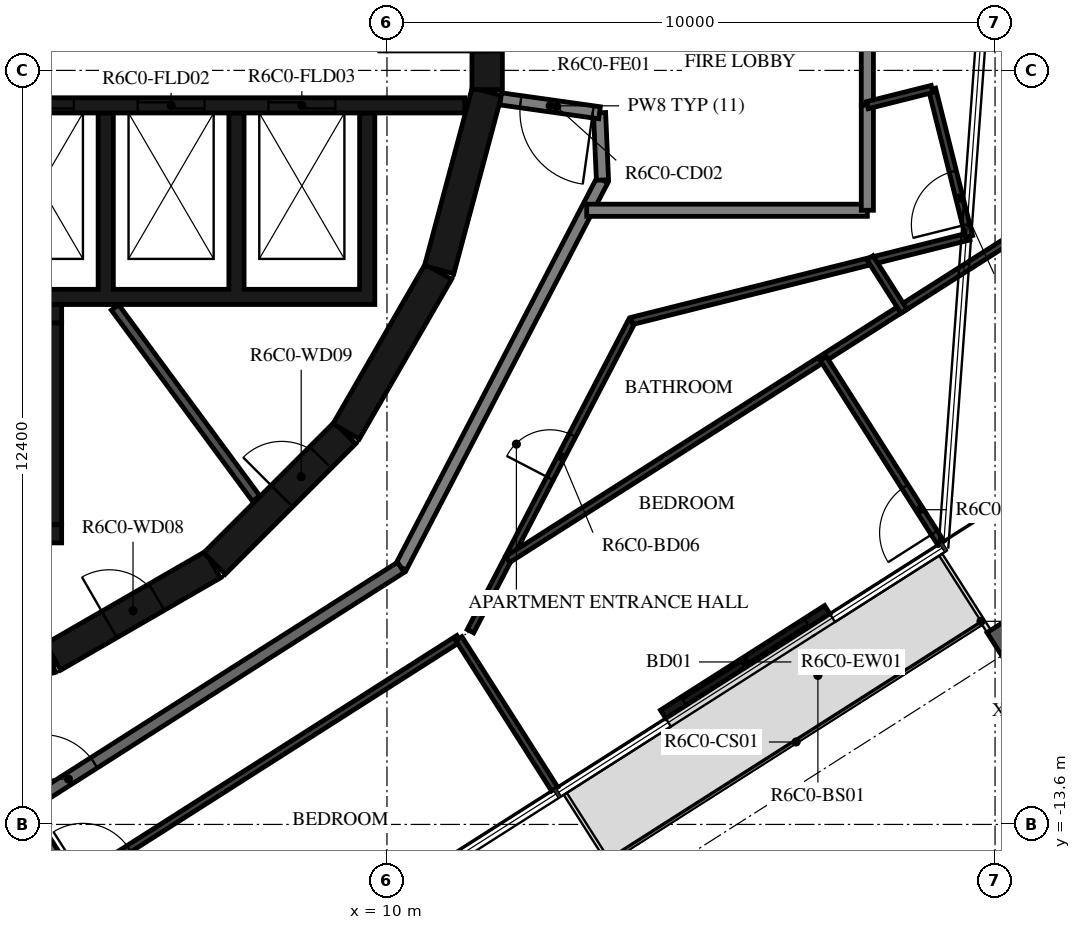
"""IFC4 building model, lengths in metres.
Left out: names, types, materials, properties, quantities, classifications, styles, units other than length and angle.
Written with IfcOpenShell. Run it as: python <this file> out.ifc"""

import sys

from ifc_helpers import new_model, si_unit, direction, frame, frame_2d, origin, origin_2d, place, context, subcontext, project, spatial, polyline, rectangle, i_section, outline, extrude, element, fill, save


model = new_model("IFC4")
c1 = context("Model", 3, precision=1e-05, world=origin(), true_north=direction((0.0, 1.0)))
c2 = subcontext(c1, "Body", "Model", "MODEL_VIEW")
j1 = project(units=[si_unit("LENGTHUNIT", "METRE"), si_unit("PLANEANGLEUNIT", "RADIAN")], contexts=[c1])
p1 = place(None, origin())
s1 = spatial("IfcSite", under=j1, at=p1, CompositionType="ELEMENT")
p2 = place(p1, origin())
s2 = spatial("IfcBuilding", under=s1, at=p2, CompositionType="ELEMENT")
p3 = place(p2, frame((0.0, 0.0, 254.7)))
s3 = spatial("IfcBuildingStorey", under=s2, at=p3, CompositionType="ELEMENT", Elevation=254.7)
p4 = place(p3, frame((20.237, -10.744, -0.38), z_axis=(0.0, 0.0, 1.0), x_axis=(-0.843391139633, -0.537300088953, 0.0)))
e1 = element("IfcColumn", 1, at=p4, inside=s3, PredefinedType="COLUMN", context=c2, shape_type="SweptSolid", body=[
    extrude(i_section(OverallWidth=0.3, OverallDepth=0.9, WebThickness=0.019, FlangeThickness=0.035, FilletRadius=0.03, at=origin_2d()), origin(), (0.0, 0.0, 1.0), 2.616),
])
p5 = place(p3, frame((14.541, -11.788, 0.0), z_axis=(0.0, 0.0, 1.0), x_axis=(0.843419508298, 0.53725555653, 0.0)))
e2 = element("IfcWall", 2, at=p5, inside=s3, PredefinedType="STANDARD", context=c2, shape_type="SweptSolid", body=[
    extrude(rectangle(XDim=3.2, YDim=0.16, at=frame_2d((1.6, 0.0))), origin(), (0.0, 0.0, 1.0), 3.05),
])
p6 = place(p5, frame((0.4, 0.0, 0.0)))
e3 = element("IfcOpeningElement", 3, at=p6, cuts=e2, PredefinedType="OPENING", context=c2, shape_type="SweptSolid", body=[
    extrude(rectangle(XDim=2.4, YDim=2.4, at=frame_2d((1.2, 1.2))), frame((0.0, 0.09, 0.0), z_axis=(0.0, -1.0, 0.0), x_axis=(1.0, 0.0, 0.0)), (0.0, 0.0, 1.0), 0.18),
])
p7 = place(p3, frame((1.55, -11.643, 0.0), z_axis=(0.0, 0.0, 1.0), x_axis=(0.965948410781, 0.258734743916, 0.0)))
e4 = element("IfcWall", 4, at=p7, inside=s3, PredefinedType="SHEAR", context=c2, shape_type="SweptSolid", body=[
    extrude(rectangle(XDim=3.033, YDim=0.5, at=frame_2d((1.516, 0.0))), origin(), (0.0, 0.0, 1.0), 3.05),
])
p8 = place(p3, frame((4.51, -10.845, 0.0), z_axis=(0.0, 0.0, 1.0), x_axis=(0.865975092491, 0.500087131594, 0.0)))
e5 = element("IfcWall", 5, at=p8, inside=s3, PredefinedType="SHEAR", context=c2, shape_type="SweptSolid", body=[
    extrude(rectangle(XDim=3.033, YDim=0.5, at=frame_2d((1.516, 0.0))), origin(), (0.0, 0.0, 1.0), 3.05),
])
p9 = place(p8, frame((1.066, 0.0, 0.0)))
e6 = element("IfcOpeningElement", 6, at=p9, cuts=e5, PredefinedType="OPENING", context=c2, shape_type="SweptSolid", body=[
    extrude(rectangle(XDim=0.9, YDim=2.1, at=frame_2d((0.45, 1.05))), frame((0.0, 0.26, 0.0), z_axis=(0.0, -1.0, 0.0), x_axis=(1.0, 0.0, 0.0)), (0.0, 0.0, 1.0), 0.52),
])
p10 = place(p3, frame((7.164, -9.308, 0.0), z_axis=(0.0, 0.0, 1.0), x_axis=(0.707106781187, 0.707106781187, 0.0)))
e7 = element("IfcWall", 7, at=p10, inside=s3, PredefinedType="SHEAR", context=c2, shape_type="SweptSolid", body=[
    extrude(rectangle(XDim=3.032, YDim=0.5, at=frame_2d((1.516, 0.0))), origin(), (0.0, 0.0, 1.0), 3.05),
])
p11 = place(p10, frame((1.566, 0.0, 0.0)))
e8 = element("IfcOpeningElement", 8, at=p11, cuts=e7, PredefinedType="OPENING", context=c2, shape_type="SweptSolid", body=[
    extrude(rectangle(XDim=0.9, YDim=2.1, at=frame_2d((0.45, 1.05))), frame((0.0, 0.26, 0.0), z_axis=(0.0, -1.0, 0.0), x_axis=(1.0, 0.0, 0.0)), (0.0, 0.0, 1.0), 0.52),
])
for number, where, z_axis, x_axis in (
    (9, (9.329, -7.137, 0.0), (0.0, 0.0, 1.0), (0.5, 0.866, 0.0)),
    (10, (10.858, -4.479, 0.0), (0.0, 0.0, 1.0), (0.259, 0.966, 0.0)),
):
    element("IfcWall", number, at=place(p3, frame(where, z_axis=z_axis, x_axis=x_axis)), inside=s3, PredefinedType="SHEAR", context=c2, shape_type="SweptSolid", body=[
        extrude(rectangle(XDim=3.033, YDim=0.5, at=frame_2d((1.516, 0.0))), origin(), (0.0, 0.0, 1.0), 3.05),
    ])
p12 = place(p3, frame((11.647, -1.516, 0.0), z_axis=(0.0, 0.0, 1.0), x_axis=(0.0, 1.0, 0.0)))
e11 = element("IfcWall", 11, at=p12, inside=s3, PredefinedType="SHEAR", context=c2, shape_type="SweptSolid", body=[
    extrude(rectangle(XDim=3.033, YDim=0.5, at=frame_2d((1.516, 0.0))), origin(), (0.0, 0.0, 1.0), 3.05),
])
p13 = place(p12, frame((0.616, 0.0, 0.0)))
e12 = element("IfcOpeningElement", 12, at=p13, cuts=e11, PredefinedType="OPENING", context=c2, shape_type="SweptSolid", body=[
    extrude(rectangle(XDim=1.8, YDim=2.1, at=frame_2d((0.9, 1.05))), frame((0.0, 0.26, 0.0), z_axis=(0.0, -1.0, 0.0), x_axis=(1.0, 0.0, 0.0)), (0.0, 0.0, 1.0), 0.52),
])
p14 = place(p3, frame((-2.4, -5.2, 0.0), z_axis=(0.0, 0.0, 1.0), x_axis=(1.0, 0.0, 0.0)))
e13 = element("IfcWall", 13, at=p14, inside=s3, PredefinedType="SHEAR", context=c2, shape_type="SweptSolid", body=[
    extrude(rectangle(XDim=7.05, YDim=0.3, at=frame_2d((3.525, 0.0))), origin(), (0.0, 0.0, 1.0), 3.05),
])
p15 = place(p3, frame((4.5, -8.67, 0.0), z_axis=(0.0, 0.0, 1.0), x_axis=(0.0, 1.0, 0.0)))
e14 = element("IfcWall", 14, at=p15, inside=s3, PredefinedType="SHEAR", context=c2, shape_type="SweptSolid", body=[
    extrude(rectangle(XDim=3.32, YDim=0.3, at=frame_2d((1.66, 0.0))), origin(), (0.0, 0.0, 1.0), 3.05),
])
p16 = place(p3, frame((0.1, -8.82, 0.0), z_axis=(0.0, 0.0, 1.0), x_axis=(1.0, 0.0, 0.0)))
e15 = element("IfcWall", 15, at=p16, inside=s3, PredefinedType="SHEAR", context=c2, shape_type="SweptSolid", body=[
    extrude(rectangle(XDim=4.55, YDim=0.3, at=frame_2d((2.275, 0.0))), origin(), (0.0, 0.0, 1.0), 3.05),
])
p17 = place(p3, origin())
e16 = element("IfcWall", 16, at=p17, inside=s3, PredefinedType="SHEAR", context=c2, shape_type="SweptSolid", body=[
    extrude(outline(polyline([(9.8, -5.05), (9.8, -4.8), (9.8, -1.9), (9.55, -1.9), (9.55, -4.8), (7.65, -4.8), (7.65, -1.9), (7.4, -1.9), (7.4, -4.8), (5.5, -4.8), (5.5, -1.9), (5.25, -1.9), (5.25, -4.8), (3.35, -4.8), (3.35, -1.9), (3.1, -1.9), (3.1, -4.8), (1.2, -4.8), (1.2, -1.9), (0.95, -1.9), (0.95, -4.8), (-0.95, -4.8), (-0.95, -1.9), (-1.2, -1.9), (-1.2, -4.8), (-3.1, -4.8), (-3.1, -1.9), (-3.35, -1.9), (-3.35, -4.8), (-5.25, -4.8), (-5.25, -1.9), (-5.5, -1.9), (-5.5, -4.8), (-7.4, -4.8), (-7.4, -1.9), (-7.65, -1.9), (-7.65, -4.8), (-9.55, -4.8), (-9.55, -1.9), (-9.8, -1.9), (-9.8, -4.8), (-9.8, -5.05), (9.8, -5.05)])), origin(), (0.0, 0.0, 1.0), 3.05),
])
p18 = place(p3, frame((3.35, -1.775, 0.0), z_axis=(0.0, 0.0, 1.0), x_axis=(1.0, 0.0, 0.0)))
e17 = element("IfcWall", 17, at=p18, inside=s3, PredefinedType="SHEAR", context=c2, shape_type="SweptSolid", body=[
    extrude(rectangle(XDim=7.93, YDim=0.25, at=frame_2d((3.965, 0.0))), origin(), (0.0, 0.0, 1.0), 3.05),
])
p19 = place(p18, frame((0.4, 0.0, 0.0)))
e18 = element("IfcOpeningElement", 18, at=p19, cuts=e17, PredefinedType="OPENING", context=c2, shape_type="SweptSolid", body=[
    extrude(rectangle(XDim=1.1, YDim=2.4, at=frame_2d((0.55, 1.2))), frame((0.0, 0.135, 0.0), z_axis=(0.0, -1.0, 0.0), x_axis=(1.0, 0.0, 0.0)), (0.0, 0.0, 1.0), 0.27),
])
p20 = place(p18, frame((2.55, 0.0, 0.0)))
e19 = element("IfcOpeningElement", 19, at=p20, cuts=e17, PredefinedType="OPENING", context=c2, shape_type="SweptSolid", body=[
    extrude(rectangle(XDim=1.1, YDim=2.4, at=frame_2d((0.55, 1.2))), frame((0.0, 0.135, 0.0), z_axis=(0.0, -1.0, 0.0), x_axis=(1.0, 0.0, 0.0)), (0.0, 0.0, 1.0), 0.27),
])
p21 = place(p18, frame((4.7, 0.0, 0.0)))
e20 = element("IfcOpeningElement", 20, at=p21, cuts=e17, PredefinedType="OPENING", context=c2, shape_type="SweptSolid", body=[
    extrude(rectangle(XDim=1.1, YDim=2.4, at=frame_2d((0.55, 1.2))), frame((0.0, 0.135, 0.0), z_axis=(0.0, -1.0, 0.0), x_axis=(1.0, 0.0, 0.0)), (0.0, 0.0, 1.0), 0.27),
])
p22 = place(p3, frame((5.528, -5.098, 0.0), z_axis=(0.0, 0.0, 1.0), x_axis=(0.594034318069, -0.804439698769, 0.0)))
e21 = element("IfcWall", 21, at=p22, inside=s3, PredefinedType="PARTITIONING", context=c2, shape_type="SweptSolid", body=[
    extrude(rectangle(XDim=3.907, YDim=0.15, at=frame_2d((1.953, 0.0))), origin(), (0.0, 0.0, 1.0), 3.05),
])
p23 = place(p3, frame((10.228, -9.372, 0.0), z_axis=(0.0, 0.0, 1.0), x_axis=(0.461759464021, 0.887005184532, 0.0)))
e22 = element("IfcWall", 22, at=p23, inside=s3, PredefinedType="STANDARD", context=c2, shape_type="SweptSolid", body=[
    extrude(rectangle(XDim=7.181, YDim=0.2, at=frame_2d((3.591, 0.0))), origin(), (0.0, 0.0, 1.0), 3.05),
])
p24 = place(p3, frame((13.544, -3.003, 0.0), z_axis=(0.0, 0.0, 1.0), x_axis=(-0.043666917606, 0.999046145234, 0.0)))
e23 = element("IfcWall", 23, at=p24, inside=s3, PredefinedType="STANDARD", context=c2, shape_type="SweptSolid", body=[
    extrude(rectangle(XDim=1.107, YDim=0.2, at=frame_2d((0.553, 0.0))), origin(), (0.0, 0.0, 1.0), 3.05),
])
p25 = place(p3, frame((13.496, -1.897, 0.0), z_axis=(0.0, 0.0, 1.0), x_axis=(-0.99026234641, 0.139213811391, 0.0)))
e24 = element("IfcWall", 24, at=p25, inside=s3, PredefinedType="STANDARD", context=c2, shape_type="SweptSolid", body=[
    extrude(rectangle(XDim=1.641, YDim=0.2, at=frame_2d((0.821, 0.0))), origin(), (0.0, 0.0, 1.0), 3.05),
])
p26 = place(p25, frame((0.11, 0.0, 0.0)))
e25 = element("IfcOpeningElement", 25, at=p26, cuts=e24, PredefinedType="OPENING", context=c2, shape_type="SweptSolid", body=[
    extrude(rectangle(XDim=1.2, YDim=2.1, at=frame_2d((0.6, 1.05))), frame((0.0, 0.11, 0.0), z_axis=(0.0, -1.0, 0.0), x_axis=(1.0, 0.0, 0.0)), (0.0, 0.0, 1.0), 0.22),
])
p27 = place(p3, frame((4.172, -13.231, 0.0), z_axis=(0.0, 0.0, 1.0), x_axis=(0.843388394728, 0.537304397561, 0.0)))
e26 = element("IfcWall", 26, at=p27, inside=s3, PredefinedType="STANDARD", context=c2, shape_type="SweptSolid", body=[
    extrude(rectangle(XDim=7.181, YDim=0.2, at=frame_2d((3.59, 0.0))), origin(), (0.0, 0.0, 1.0), 3.05),
])
p28 = place(p27, frame((0.2, 0.0, 0.0)))
e27 = element("IfcOpeningElement", 27, at=p28, cuts=e26, PredefinedType="OPENING", context=c2, shape_type="SweptSolid", body=[
    extrude(rectangle(XDim=1.0, YDim=2.1, at=frame_2d((0.5, 1.05))), frame((0.0, 0.11, 0.0), z_axis=(0.0, -1.0, 0.0), x_axis=(1.0, 0.0, 0.0)), (0.0, 0.0, 1.0), 0.22),
])
p29 = place(p3, frame((17.9, -1.772, 0.0), z_axis=(0.0, 0.0, 1.0), x_axis=(0.0, 1.0, 0.0)))
e28 = element("IfcWall", 28, at=p29, inside=s3, PredefinedType="STANDARD", context=c2, shape_type="SweptSolid", body=[
    extrude(rectangle(XDim=5.272, YDim=0.2, at=frame_2d((2.636, 0.0))), origin(), (0.0, 0.0, 1.0), 3.05),
])
p30 = place(p3, frame((13.285, -3.5, 0.0), z_axis=(0.0, 0.0, 1.0), x_axis=(1.0, 0.0, 0.0)))
e29 = element("IfcWall", 29, at=p30, inside=s3, PredefinedType="STANDARD", context=c2, shape_type="SweptSolid", body=[
    extrude(rectangle(XDim=4.615, YDim=0.2, at=frame_2d((2.308, 0.0))), origin(), (0.0, 0.0, 1.0), 3.05),
])
p31 = place(p3, frame((17.9, -3.5, 0.0), z_axis=(0.0, 0.0, 1.0), x_axis=(0.0, 1.0, 0.0)))
e30 = element("IfcWall", 30, at=p31, inside=s3, PredefinedType="STANDARD", context=c2, shape_type="SweptSolid", body=[
    extrude(rectangle(XDim=1.728, YDim=0.2, at=frame_2d((0.864, 0.0))), origin(), (0.0, 0.0, 1.0), 3.05),
])
p32 = place(p3, frame((6.407, -17.064, 0.0), z_axis=(0.0, 0.0, 1.0), x_axis=(-0.537324777979, 0.843375410461, 0.0)))
e31 = element("IfcWall", 31, at=p32, inside=s3, PredefinedType="STANDARD", context=c2, shape_type="SweptSolid", body=[
    extrude(rectangle(XDim=4.535, YDim=0.2, at=frame_2d((2.268, 0.0))), origin(), (0.0, 0.0, 1.0), 3.05),
])
p33 = place(p3, frame((4.83, -14.59, 0.0), z_axis=(0.0, 0.0, 1.0), x_axis=(0.843393042763, 0.537297101629, 0.0)))
e32 = element("IfcWall", 32, at=p33, inside=s3, PredefinedType="PARTITIONING", context=c2, shape_type="SweptSolid", body=[
    extrude(rectangle(XDim=7.53, YDim=0.12, at=frame_2d((3.765, 0.0))), origin(), (0.0, 0.0, 1.0), 3.05),
])
p34 = place(p33, frame((0.2, 0.0, 0.0)))
e33 = element("IfcOpeningElement", 33, at=p34, cuts=e32, PredefinedType="OPENING", context=c2, shape_type="SweptSolid", body=[
    extrude(rectangle(XDim=0.9, YDim=2.1, at=frame_2d((0.45, 1.05))), frame((0.0, 0.07, 0.0), z_axis=(0.0, -1.0, 0.0), x_axis=(1.0, 0.0, 0.0)), (0.0, 0.0, 1.0), 0.14),
])
p35 = place(p3, frame((11.373, -10.421, 0.0), z_axis=(0.0, 0.0, 1.0), x_axis=(0.461738939635, 0.887015868869, 0.0)))
e34 = element("IfcWall", 34, at=p35, inside=s3, PredefinedType="PARTITIONING", context=c2, shape_type="SweptSolid", body=[
    extrude(rectangle(XDim=5.752, YDim=0.12, at=frame_2d((2.876, 0.0))), origin(), (0.0, 0.0, 1.0), 3.05),
])
p36 = place(p35, frame((2.831, 0.0, 0.0)))
e35 = element("IfcOpeningElement", 35, at=p36, cuts=e34, PredefinedType="OPENING", context=c2, shape_type="SweptSolid", body=[
    extrude(rectangle(XDim=0.8, YDim=2.1, at=frame_2d((0.4, 1.05))), frame((0.0, 0.07, 0.0), z_axis=(0.0, -1.0, 0.0), x_axis=(1.0, 0.0, 0.0)), (0.0, 0.0, 1.0), 0.14),
])
p37 = place(p3, frame((14.029, -5.32, 0.0), z_axis=(0.0, 0.0, 1.0), x_axis=(0.969999099814, 0.243108507378, 0.0)))
e36 = element("IfcWall", 36, at=p37, inside=s3, PredefinedType="PARTITIONING", context=c2, shape_type="SweptSolid", body=[
    extrude(rectangle(XDim=5.715, YDim=0.12, at=frame_2d((2.857, 0.0))), origin(), (0.0, 0.0, 1.0), 3.05),
])
p38 = place(p3, frame((19.573, -3.93, 0.0), z_axis=(0.0, 0.0, 1.0), x_axis=(-0.243155959183, 0.96998720585, 0.0)))
e37 = element("IfcWall", 37, at=p38, inside=s3, PredefinedType="PARTITIONING", context=c2, shape_type="SweptSolid", body=[
    extrude(rectangle(XDim=2.5, YDim=0.12, at=frame_2d((1.25, 0.0))), origin(), (0.0, 0.0, 1.0), 3.05),
])
p39 = place(p38, frame((0.2, 0.0, 0.0)))
e38 = element("IfcOpeningElement", 38, at=p39, cuts=e37, PredefinedType="OPENING", context=c2, shape_type="SweptSolid", body=[
    extrude(rectangle(XDim=0.9, YDim=2.1, at=frame_2d((0.45, 1.05))), frame((0.0, 0.07, 0.0), z_axis=(0.0, -1.0, 0.0), x_axis=(1.0, 0.0, 0.0)), (0.0, 0.0, 1.0), 0.14),
])
p40 = place(p3, frame((18.965, -1.505, 0.0), z_axis=(0.0, 0.0, 1.0), x_axis=(-0.969998406835, -0.243111272339, 0.0)))
e39 = element("IfcWall", 39, at=p40, inside=s3, PredefinedType="PARTITIONING", context=c2, shape_type="SweptSolid", body=[
    extrude(rectangle(XDim=1.098, YDim=0.12, at=frame_2d((0.549, 0.0))), origin(), (0.0, 0.0, 1.0), 3.05),
])
p41 = place(p3, frame((12.758, -13.018, 0.0), z_axis=(0.0, 0.0, 1.0), x_axis=(-0.537338423153, 0.843366716798, 0.0)))
e40 = element("IfcWall", 40, at=p41, inside=s3, PredefinedType="PARTITIONING", context=c2, shape_type="SweptSolid", body=[
    extrude(rectangle(XDim=2.934, YDim=0.12, at=frame_2d((1.467, 0.0))), origin(), (0.0, 0.0, 1.0), 3.05),
])
p42 = place(p3, frame((21.837, -2.966, 0.0), z_axis=(0.0, 0.0, 1.0), x_axis=(-0.843394529709, -0.537294767569, 0.0)))
e41 = element("IfcWall", 41, at=p42, inside=s3, PredefinedType="PARTITIONING", context=c2, shape_type="SweptSolid", body=[
    extrude(rectangle(XDim=11.678, YDim=0.12, at=frame_2d((5.839, 0.0))), origin(), (0.0, 0.0, 1.0), 3.05),
])
p43 = place(p42, frame((0.2, 0.0, 0.0)))
e42 = element("IfcOpeningElement", 42, at=p43, cuts=e41, PredefinedType="OPENING", context=c2, shape_type="SweptSolid", body=[
    extrude(rectangle(XDim=0.9, YDim=2.1, at=frame_2d((0.45, 1.05))), frame((0.0, 0.07, 0.0), z_axis=(0.0, -1.0, 0.0), x_axis=(1.0, 0.0, 0.0)), (0.0, 0.0, 1.0), 0.14),
])
p44 = place(p3, frame((19.109, -8.972, 0.0), z_axis=(0.0, 0.0, 1.0), x_axis=(-0.537318625891, 0.843379329999, 0.0)))
e43 = element("IfcWall", 43, at=p44, inside=s3, PredefinedType="PARTITIONING", context=c2, shape_type="SweptSolid", body=[
    extrude(rectangle(XDim=3.6, YDim=0.12, at=frame_2d((1.8, 0.0))), origin(), (0.0, 0.0, 1.0), 3.05),
])
p45 = place(p44, frame((0.2, 0.0, 0.0)))
e44 = element("IfcOpeningElement", 44, at=p45, cuts=e43, PredefinedType="OPENING", context=c2, shape_type="SweptSolid", body=[
    extrude(rectangle(XDim=0.9, YDim=2.1, at=frame_2d((0.45, 1.05))), frame((0.0, 0.07, 0.0), z_axis=(0.0, -1.0, 0.0), x_axis=(1.0, 0.0, 0.0)), (0.0, 0.0, 1.0), 0.14),
])
p46 = place(p3, frame((18.503, -5.161, 0.0), z_axis=(0.0, 0.0, 1.0), x_axis=(-0.537208231854, 0.843449652101, 0.0)))
e45 = element("IfcWall", 45, at=p46, inside=s3, PredefinedType="PARTITIONING", context=c2, shape_type="SweptSolid", body=[
    extrude(rectangle(XDim=1.044, YDim=0.12, at=frame_2d((0.522, 0.0))), origin(), (0.0, 0.0, 1.0), 3.05),
])
p47 = place(p6, origin())
e46 = element("IfcDoor", 46, at=p47, inside=s3, OperationType="DOUBLE_DOOR_SLIDING", PredefinedType="DOOR", context=c2, shape_type="SweptSolid", body=[
    extrude(rectangle(XDim=2.4, YDim=2.4, at=frame_2d((1.2, 1.2))), frame((0.0, 0.025, 0.0), z_axis=(0.0, -1.0, 0.0), x_axis=(1.0, 0.0, 0.0)), (0.0, 0.0, 1.0), 0.05),
])
fill(e3, e46)
p48 = place(p13, origin())
e47 = element("IfcDoor", 47, at=p48, inside=s3, OperationType="DOUBLE_DOOR_SINGLE_SWING", PredefinedType="DOOR", context=c2, shape_type="SweptSolid", body=[
    extrude(rectangle(XDim=1.8, YDim=2.1, at=frame_2d((0.9, 1.05))), frame((0.0, 0.025, 0.0), z_axis=(0.0, -1.0, 0.0), x_axis=(1.0, 0.0, 0.0)), (0.0, 0.0, 1.0), 0.05),
])
fill(e12, e47)
p49 = place(p19, origin())
e48 = element("IfcDoor", 48, at=p49, inside=s3, OperationType="DOUBLE_DOOR_SLIDING", PredefinedType="DOOR", context=c2, shape_type="SweptSolid", body=[
    extrude(rectangle(XDim=1.1, YDim=2.4, at=frame_2d((0.55, 1.2))), frame((0.0, 0.025, 0.0), z_axis=(0.0, -1.0, 0.0), x_axis=(1.0, 0.0, 0.0)), (0.0, 0.0, 1.0), 0.05),
])
fill(e18, e48)
p50 = place(p20, origin())
e49 = element("IfcDoor", 49, at=p50, inside=s3, OperationType="DOUBLE_DOOR_SLIDING", PredefinedType="DOOR", context=c2, shape_type="SweptSolid", body=[
    extrude(rectangle(XDim=1.1, YDim=2.4, at=frame_2d((0.55, 1.2))), frame((0.0, 0.025, 0.0), z_axis=(0.0, -1.0, 0.0), x_axis=(1.0, 0.0, 0.0)), (0.0, 0.0, 1.0), 0.05),
])
fill(e19, e49)
p51 = place(p21, origin())
e50 = element("IfcDoor", 50, at=p51, inside=s3, OperationType="DOUBLE_DOOR_SLIDING", PredefinedType="DOOR", context=c2, shape_type="SweptSolid", body=[
    extrude(rectangle(XDim=1.1, YDim=2.4, at=frame_2d((0.55, 1.2))), frame((0.0, 0.025, 0.0), z_axis=(0.0, -1.0, 0.0), x_axis=(1.0, 0.0, 0.0)), (0.0, 0.0, 1.0), 0.05),
])
fill(e20, e50)
p52 = place(p9, origin())
e51 = element("IfcDoor", 51, at=p52, inside=s3, OperationType="SINGLE_SWING_RIGHT", PredefinedType="DOOR", context=c2, shape_type="SweptSolid", body=[
    extrude(rectangle(XDim=0.9, YDim=2.1, at=frame_2d((0.45, 1.05))), frame((0.0, 0.025, 0.0), z_axis=(0.0, -1.0, 0.0), x_axis=(1.0, 0.0, 0.0)), (0.0, 0.0, 1.0), 0.05),
])
fill(e6, e51)
p53 = place(p11, origin())
e52 = element("IfcDoor", 52, at=p53, inside=s3, OperationType="SINGLE_SWING_LEFT", PredefinedType="DOOR", context=c2, shape_type="SweptSolid", body=[
    extrude(rectangle(XDim=0.9, YDim=2.1, at=frame_2d((0.45, 1.05))), frame((0.0, 0.025, 0.0), z_axis=(0.0, -1.0, 0.0), x_axis=(1.0, 0.0, 0.0)), (0.0, 0.0, 1.0), 0.05),
])
fill(e8, e52)
p54 = place(p28, origin())
e53 = element("IfcDoor", 53, at=p54, inside=s3, OperationType="SINGLE_SWING_LEFT", PredefinedType="DOOR", context=c2, shape_type="SweptSolid", body=[
    extrude(rectangle(XDim=1.0, YDim=2.1, at=frame_2d((0.5, 1.05))), frame((0.0, 0.025, 0.0), z_axis=(0.0, -1.0, 0.0), x_axis=(1.0, 0.0, 0.0)), (0.0, 0.0, 1.0), 0.05),
])
fill(e27, e53)
p55 = place(p34, origin())
e54 = element("IfcDoor", 54, at=p55, inside=s3, OperationType="SINGLE_SWING_LEFT", PredefinedType="DOOR", context=c2, shape_type="SweptSolid", body=[
    extrude(rectangle(XDim=0.9, YDim=2.1, at=frame_2d((0.45, 1.05))), frame((0.0, 0.025, 0.0), z_axis=(0.0, -1.0, 0.0), x_axis=(1.0, 0.0, 0.0)), (0.0, 0.0, 1.0), 0.05),
])
fill(e33, e54)
p56 = place(p36, origin())
e55 = element("IfcDoor", 55, at=p56, inside=s3, OperationType="SINGLE_SWING_RIGHT", PredefinedType="DOOR", context=c2, shape_type="SweptSolid", body=[
    extrude(rectangle(XDim=0.8, YDim=2.1, at=frame_2d((0.4, 1.05))), frame((0.0, 0.025, 0.0), z_axis=(0.0, -1.0, 0.0), x_axis=(1.0, 0.0, 0.0)), (0.0, 0.0, 1.0), 0.05),
])
fill(e35, e55)
p57 = place(p39, origin())
e56 = element("IfcDoor", 56, at=p57, inside=s3, OperationType="SINGLE_SWING_RIGHT", PredefinedType="DOOR", context=c2, shape_type="SweptSolid", body=[
    extrude(rectangle(XDim=0.9, YDim=2.1, at=frame_2d((0.45, 1.05))), frame((0.0, 0.025, 0.0), z_axis=(0.0, -1.0, 0.0), x_axis=(1.0, 0.0, 0.0)), (0.0, 0.0, 1.0), 0.05),
])
fill(e38, e56)
p58 = place(p45, origin())
e57 = element("IfcDoor", 57, at=p58, inside=s3, OperationType="SINGLE_SWING_LEFT", PredefinedType="DOOR", context=c2, shape_type="SweptSolid", body=[
    extrude(rectangle(XDim=0.9, YDim=2.1, at=frame_2d((0.45, 1.05))), frame((0.0, 0.025, 0.0), z_axis=(0.0, -1.0, 0.0), x_axis=(1.0, 0.0, 0.0)), (0.0, 0.0, 1.0), 0.05),
])
fill(e44, e57)
p59 = place(p26, origin())
e58 = element("IfcDoor", 58, at=p59, inside=s3, OperationType="DOUBLE_DOOR_SINGLE_SWING", PredefinedType="DOOR", context=c2, shape_type="SweptSolid", body=[
    extrude(rectangle(XDim=1.2, YDim=2.1, at=frame_2d((0.6, 1.05))), frame((0.0, 0.025, 0.0), z_axis=(0.0, -1.0, 0.0), x_axis=(1.0, 0.0, 0.0)), (0.0, 0.0, 1.0), 0.05),
])
fill(e25, e58)
save(model, sys.argv[1])
